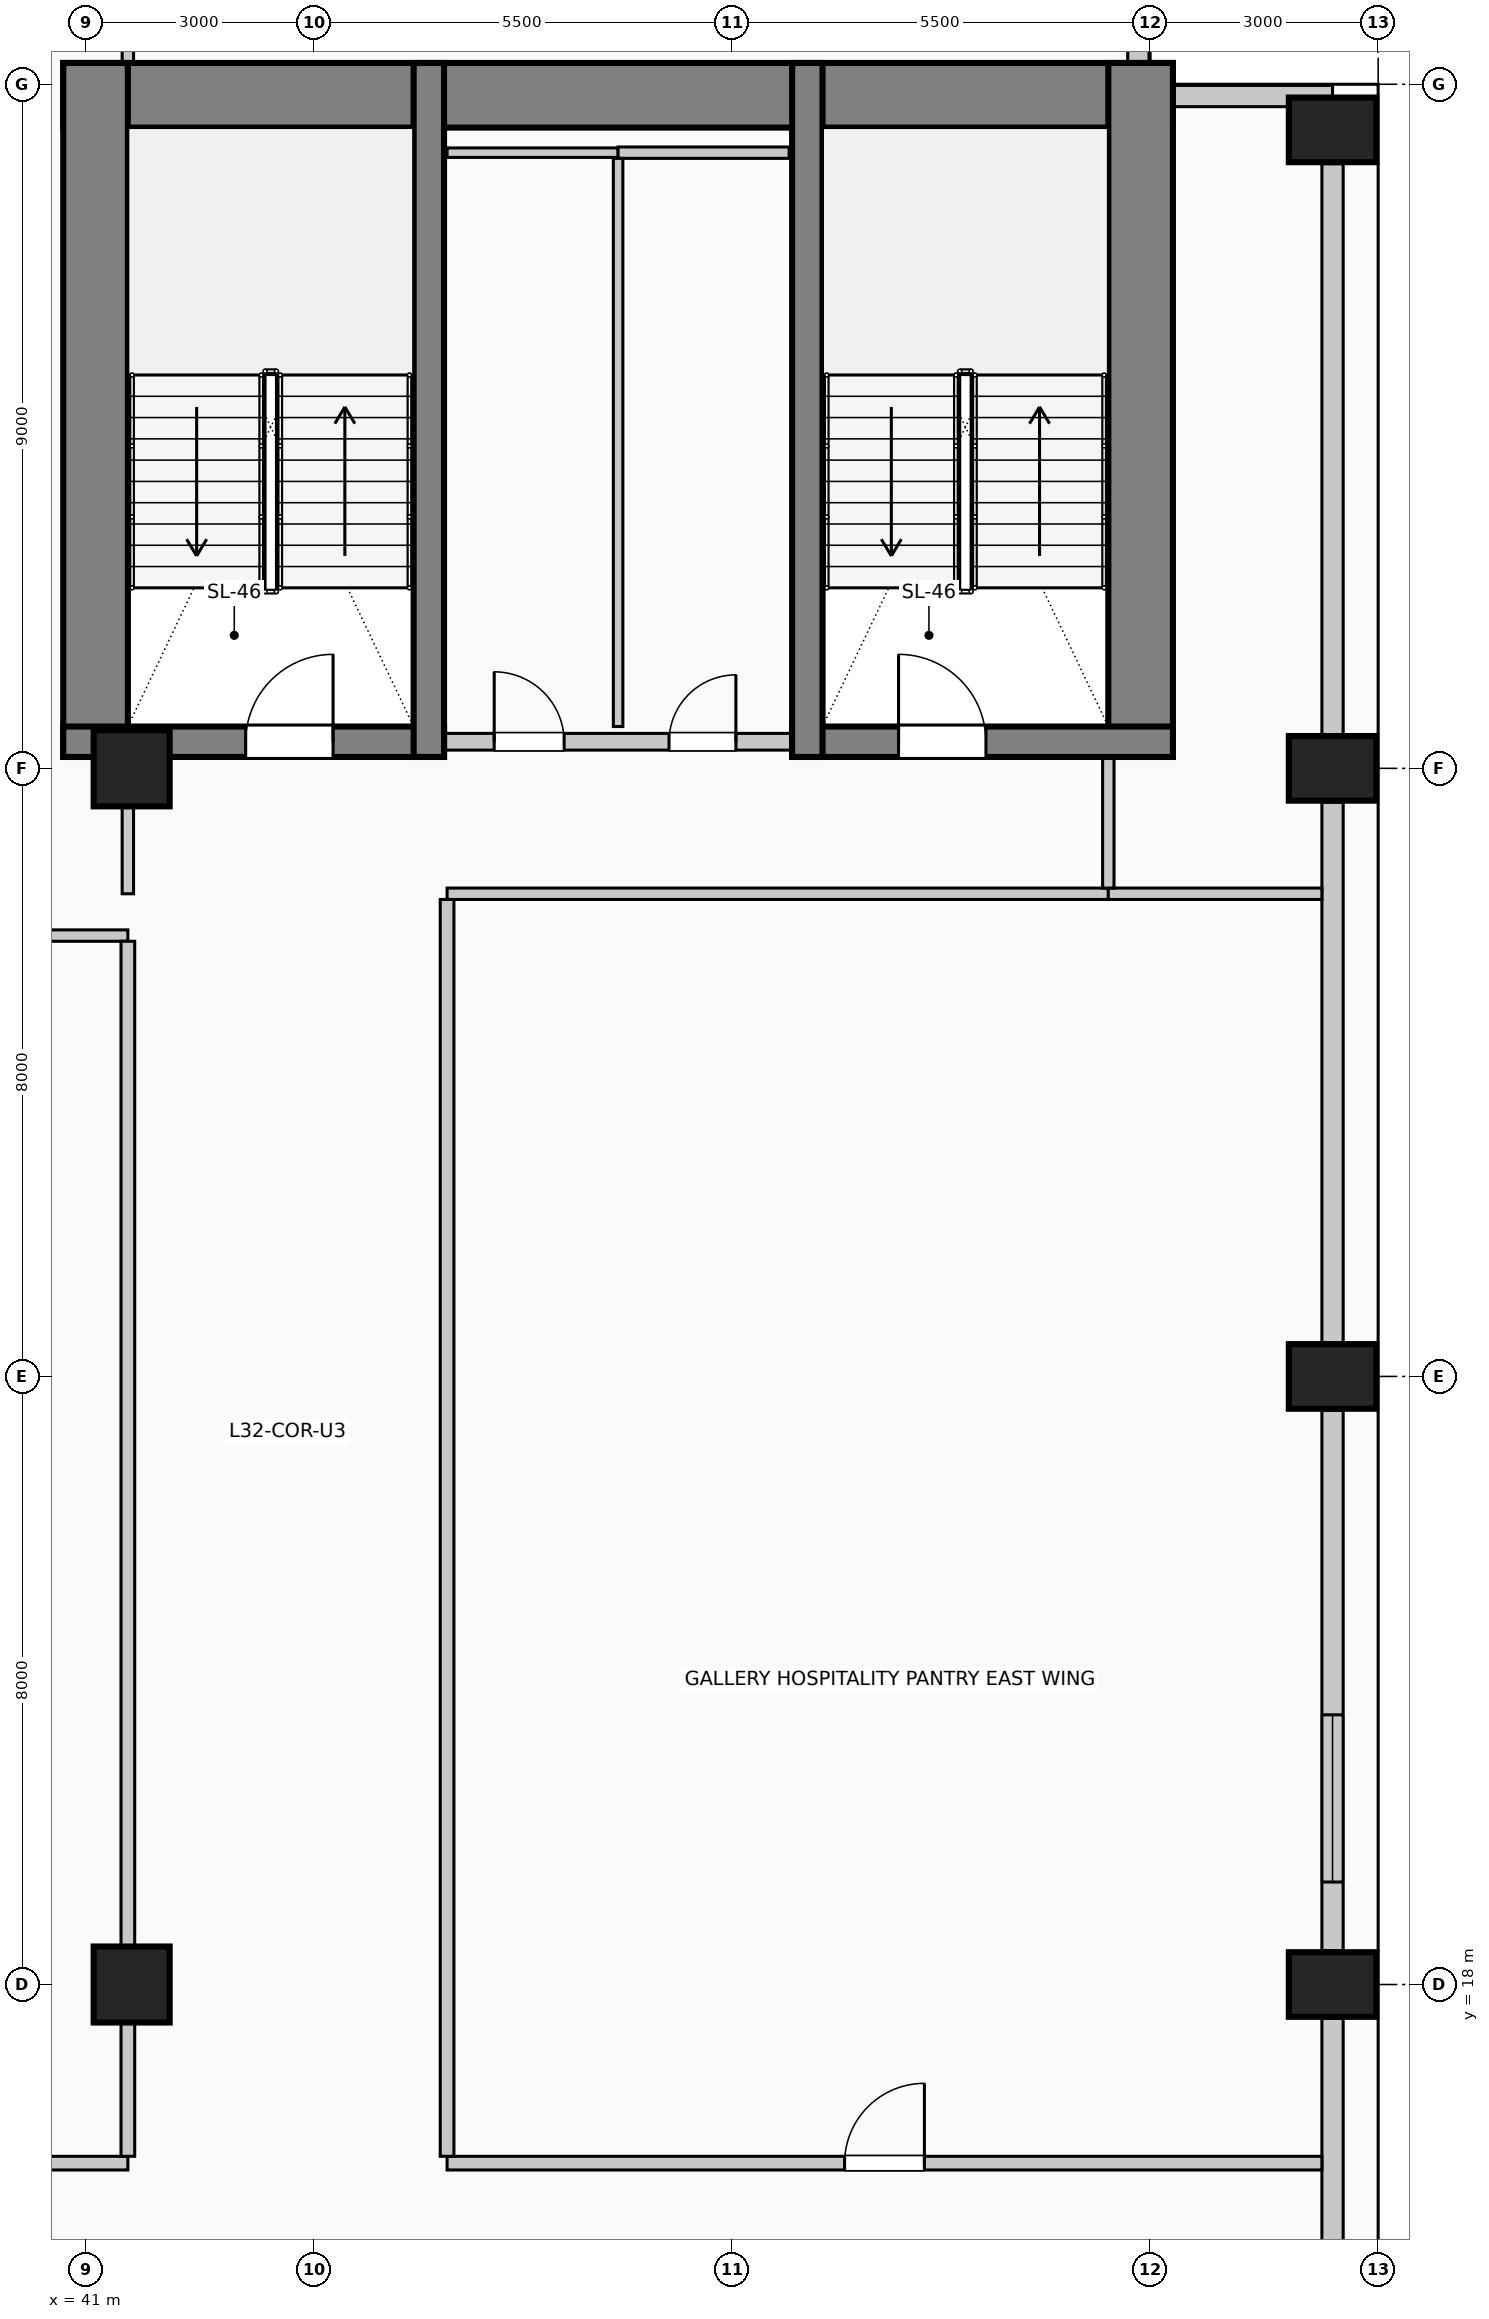
"""IFC4 building model, lengths in metres.
Left out: names, types, materials, properties, quantities, classifications, styles, units other than length and angle.
Written with IfcOpenShell. Run it as: python <this file> out.ifc"""

import sys

from ifc_helpers import new_model, si_unit, direction, frame, frame_2d, origin, origin_2d, place, context, subcontext, project, spatial, rectangle, circle, extrude, element, fill, save


model = new_model("IFC4")
c1 = context("Model", 3, precision=1e-05, world=origin(), true_north=direction((0.0, 1.0)))
c2 = subcontext(c1, "Body", "Model", "MODEL_VIEW")
j1 = project(units=[si_unit("LENGTHUNIT", "METRE"), si_unit("PLANEANGLEUNIT", "RADIAN")], contexts=[c1])
p1 = place(None, origin())
s1 = spatial("IfcSite", under=j1, at=p1, CompositionType="ELEMENT")
p2 = place(p1, origin())
s2 = spatial("IfcBuilding", under=s1, at=p2, CompositionType="ELEMENT")
p3 = place(p2, frame((0.0, 0.0, 132.6)))
s3 = spatial("IfcBuildingStorey", under=s2, at=p3, CompositionType="ELEMENT", Elevation=132.6)
p4 = place(p3, frame((40.7, 42.855, 0.0), z_axis=(0.0, 0.0, 1.0), x_axis=(1.0, 0.0, 0.0)))
e1 = element("IfcWall", 1, at=p4, inside=s3, PredefinedType="SHEAR", context=c2, shape_type="SweptSolid", body=[
    extrude(rectangle(XDim=14.6, YDim=0.85, at=frame_2d((7.3, 0.0))), origin(), (0.0, 0.0, 1.0), 4.0),
])
for number, where, z_axis, x_axis in (
    (2, (41.125, 34.15, 0.0), (0.0, 0.0, 1.0), (0.0, 1.0, 0.0)),
    (3, (54.875, 34.15, 0.0), (0.0, 0.0, 1.0), (0.0, 1.0, 0.0)),
):
    element("IfcWall", number, at=place(p3, frame(where, z_axis=z_axis, x_axis=x_axis)), inside=s3, PredefinedType="SHEAR", context=c2, shape_type="SweptSolid", body=[
        extrude(rectangle(XDim=9.13, YDim=0.85, at=frame_2d((4.565, 0.0))), origin(), (0.0, 0.0, 1.0), 4.0),
    ])
p5 = place(p3, frame((40.7, 34.35, 0.0), z_axis=(0.0, 0.0, 1.0), x_axis=(1.0, 0.0, 0.0)))
e4 = element("IfcWall", 4, at=p5, inside=s3, PredefinedType="SHEAR", context=c2, shape_type="SweptSolid", body=[
    extrude(rectangle(XDim=5.01, YDim=0.4, at=frame_2d((2.505, 0.0))), origin(), (0.0, 0.0, 1.0), 4.0),
])
p6 = place(p5, frame((2.4, 0.0, 0.0)))
e5 = element("IfcOpeningElement", 5, at=p6, cuts=e4, PredefinedType="OPENING", context=c2, shape_type="SweptSolid", body=[
    extrude(rectangle(XDim=1.15, YDim=2.2, at=frame_2d((0.575, 1.1))), frame((0.0, 0.21, 0.0), z_axis=(0.0, -1.0, 0.0), x_axis=(1.0, 0.0, 0.0)), (0.0, 0.0, 1.0), 0.42),
])
p7 = place(p3, frame((45.51, 34.15, 0.0), z_axis=(0.0, 0.0, 1.0), x_axis=(0.0, 1.0, 0.0)))
e6 = element("IfcWall", 6, at=p7, inside=s3, PredefinedType="SHEAR", context=c2, shape_type="SweptSolid", body=[
    extrude(rectangle(XDim=9.13, YDim=0.4, at=frame_2d((4.565, 0.0))), origin(), (0.0, 0.0, 1.0), 4.0),
])
p8 = place(p3, frame((50.29, 34.35, 0.0), z_axis=(0.0, 0.0, 1.0), x_axis=(1.0, 0.0, 0.0)))
e7 = element("IfcWall", 7, at=p8, inside=s3, PredefinedType="SHEAR", context=c2, shape_type="SweptSolid", body=[
    extrude(rectangle(XDim=5.01, YDim=0.4, at=frame_2d((2.505, 0.0))), origin(), (0.0, 0.0, 1.0), 4.0),
])
p9 = place(p8, frame((1.4, 0.0, 0.0)))
e8 = element("IfcOpeningElement", 8, at=p9, cuts=e7, PredefinedType="OPENING", context=c2, shape_type="SweptSolid", body=[
    extrude(rectangle(XDim=1.15, YDim=2.2, at=frame_2d((0.575, 1.1))), frame((0.0, 0.21, 0.0), z_axis=(0.0, -1.0, 0.0), x_axis=(1.0, 0.0, 0.0)), (0.0, 0.0, 1.0), 0.42),
])
p10 = place(p3, frame((50.49, 34.15, 0.0), z_axis=(0.0, 0.0, 1.0), x_axis=(0.0, 1.0, 0.0)))
e9 = element("IfcWall", 9, at=p10, inside=s3, PredefinedType="SHEAR", context=c2, shape_type="SweptSolid", body=[
    extrude(rectangle(XDim=9.13, YDim=0.4, at=frame_2d((4.565, 0.0))), origin(), (0.0, 0.0, 1.0), 4.0),
])
for number, where, z_axis, x_axis in (
    (10, (57.4, 18.0, 0.0), (0.0, 0.0, 1.0), (0.0, 1.0, 0.0)),
    (11, (57.4, 26.0, 0.0), (0.0, 0.0, 1.0), (0.0, 1.0, 0.0)),
    (12, (57.4, 34.0, 0.0), (0.0, 0.0, 1.0), (0.0, 1.0, 0.0)),
    (13, (57.4, 42.4, 0.0), (0.0, 0.0, 1.0), (0.0, 1.0, 0.0)),
):
    element("IfcColumn", number, at=place(p3, frame(where, z_axis=z_axis, x_axis=x_axis)), inside=s3, PredefinedType="COLUMN", context=c2, shape_type="SweptSolid", body=[
        extrude(rectangle(XDim=0.85, YDim=1.15, at=origin_2d()), origin(), (0.0, 0.0, 1.0), 4.0),
    ])
for number, where, z_axis, x_axis in (
    (14, (41.6, 18.0, 0.0), (0.0, 0.0, 1.0), (1.0, 0.0, 0.0)),
    (15, (41.6, 34.0, 0.0), (0.0, 0.0, 1.0), (1.0, 0.0, 0.0)),
):
    element("IfcColumn", number, at=place(p3, frame(where, z_axis=z_axis, x_axis=x_axis)), inside=s3, PredefinedType="COLUMN", context=c2, shape_type="SweptSolid", body=[
        extrude(circle(Radius=0.5, at=origin_2d()), origin(), (0.0, 0.0, 1.0), 4.0),
    ])
p11 = place(p3, frame((57.4, 17.555, 0.0), z_axis=(0.0, 0.0, 1.0), x_axis=(0.0, -1.0, 0.0)))
e16 = element("IfcWall", 16, at=p11, inside=s3, PredefinedType="SOLIDWALL", context=c2, shape_type="SweptSolid", body=[
    extrude(rectangle(XDim=7.11, YDim=0.28, at=frame_2d((3.555, 0.0))), origin(), (0.0, 0.0, 1.0), 2.875),
])
p12 = place(p3, frame((57.4, 25.555, 0.0), z_axis=(0.0, 0.0, 1.0), x_axis=(0.0, -1.0, 0.0)))
e17 = element("IfcWall", 17, at=p12, inside=s3, PredefinedType="SOLIDWALL", context=c2, shape_type="SweptSolid", body=[
    extrude(rectangle(XDim=7.11, YDim=0.28, at=frame_2d((3.555, 0.0))), origin(), (0.0, 0.0, 1.0), 2.875),
])
p13 = place(p12, frame((4.007, 0.0, 0.5)))
e18 = element("IfcOpeningElement", 18, at=p13, cuts=e17, PredefinedType="OPENING", context=c2, shape_type="SweptSolid", body=[
    extrude(rectangle(XDim=2.2, YDim=1.95, at=frame_2d((1.1, 0.975))), frame((0.0, 0.15, 0.0), z_axis=(0.0, -1.0, 0.0), x_axis=(1.0, 0.0, 0.0)), (0.0, 0.0, 1.0), 0.3),
])
p14 = place(p3, frame((57.4, 33.555, 0.0), z_axis=(0.0, 0.0, 1.0), x_axis=(0.0, -1.0, 0.0)))
e19 = element("IfcWall", 19, at=p14, inside=s3, PredefinedType="SOLIDWALL", context=c2, shape_type="SweptSolid", body=[
    extrude(rectangle(XDim=7.11, YDim=0.28, at=frame_2d((3.555, 0.0))), origin(), (0.0, 0.0, 1.0), 2.875),
])
p15 = place(p3, frame((57.4, 41.955, 0.0), z_axis=(0.0, 0.0, 1.0), x_axis=(0.0, -1.0, 0.0)))
e20 = element("IfcWall", 20, at=p15, inside=s3, PredefinedType="SOLIDWALL", context=c2, shape_type="SweptSolid", body=[
    extrude(rectangle(XDim=7.51, YDim=0.28, at=frame_2d((3.755, 0.0))), origin(), (0.0, 0.0, 1.0), 2.875),
])
p16 = place(p3, frame((54.845, 45.4, 0.0), z_axis=(0.0, 0.0, 1.0), x_axis=(0.0, -1.0, 0.0)))
e21 = element("IfcWall", 21, at=p16, inside=s3, PredefinedType="SOLIDWALL", context=c2, shape_type="SweptSolid", body=[
    extrude(rectangle(XDim=2.115, YDim=0.28, at=frame_2d((1.058, 0.0))), origin(), (0.0, 0.0, 1.0), 3.725),
])
p17 = place(p3, frame((55.305, 42.845, 0.0), z_axis=(0.0, 0.0, 1.0), x_axis=(1.0, 0.0, 0.0)))
e22 = element("IfcWall", 22, at=p17, inside=s3, PredefinedType="SOLIDWALL", context=c2, shape_type="SweptSolid", body=[
    extrude(rectangle(XDim=2.095, YDim=0.28, at=frame_2d((1.047, 0.0))), origin(), (0.0, 0.0, 1.0), 3.725),
])
p18 = place(p3, frame((45.72, 34.35, 0.0), z_axis=(0.0, 0.0, 1.0), x_axis=(1.0, 0.0, 0.0)))
e23 = element("IfcWall", 23, at=p18, inside=s3, PredefinedType="PARTITIONING", context=c2, shape_type="SweptSolid", body=[
    extrude(rectangle(XDim=4.56, YDim=0.22, at=frame_2d((2.28, 0.0))), origin(), (0.0, 0.0, 1.0), 3.725),
])
p19 = place(p18, frame((0.65, 0.0, 0.0)))
e24 = element("IfcOpeningElement", 24, at=p19, cuts=e23, PredefinedType="OPENING", context=c2, shape_type="SweptSolid", body=[
    extrude(rectangle(XDim=0.92, YDim=2.1, at=frame_2d((0.46, 1.05))), frame((0.0, 0.12, 0.0), z_axis=(0.0, -1.0, 0.0), x_axis=(1.0, 0.0, 0.0)), (0.0, 0.0, 1.0), 0.24),
])
p20 = place(p18, frame((2.95, 0.0, 0.0)))
e25 = element("IfcOpeningElement", 25, at=p20, cuts=e23, PredefinedType="OPENING", context=c2, shape_type="SweptSolid", body=[
    extrude(rectangle(XDim=0.88, YDim=2.1, at=frame_2d((0.44, 1.05))), frame((0.0, 0.12, 0.0), z_axis=(0.0, -1.0, 0.0), x_axis=(1.0, 0.0, 0.0)), (0.0, 0.0, 1.0), 0.24),
])
p21 = place(p3, frame((24.5, 15.65, 0.0), z_axis=(0.0, 0.0, 1.0), x_axis=(1.0, 0.0, 0.0)))
e26 = element("IfcWall", 26, at=p21, inside=s3, PredefinedType="PARTITIONING", context=c2, shape_type="SweptSolid", body=[
    extrude(rectangle(XDim=17.05, YDim=0.18, at=frame_2d((8.525, 0.0))), origin(), (0.0, 0.0, 1.0), 3.725),
])
p22 = place(p21, frame((8.05, 0.0, 0.0)))
e27 = element("IfcOpeningElement", 27, at=p22, cuts=e26, PredefinedType="OPENING", context=c2, shape_type="SweptSolid", body=[
    extrude(rectangle(XDim=0.95, YDim=2.15, at=frame_2d((0.475, 1.075))), frame((0.0, 0.1, 0.0), z_axis=(0.0, -1.0, 0.0), x_axis=(1.0, 0.0, 0.0)), (0.0, 0.0, 1.0), 0.2),
])
p23 = place(p3, frame((45.75, 15.65, 0.0), z_axis=(0.0, 0.0, 1.0), x_axis=(1.0, 0.0, 0.0)))
e28 = element("IfcWall", 28, at=p23, inside=s3, PredefinedType="PARTITIONING", context=c2, shape_type="SweptSolid", body=[
    extrude(rectangle(XDim=11.51, YDim=0.18, at=frame_2d((5.755, 0.0))), origin(), (0.0, 0.0, 1.0), 3.725),
])
p24 = place(p23, frame((5.23, 0.0, 0.0)))
e29 = element("IfcOpeningElement", 29, at=p24, cuts=e28, PredefinedType="OPENING", context=c2, shape_type="SweptSolid", body=[
    extrude(rectangle(XDim=1.05, YDim=2.15, at=frame_2d((0.525, 1.075))), frame((0.0, 0.1, 0.0), z_axis=(0.0, -1.0, 0.0), x_axis=(1.0, 0.0, 0.0)), (0.0, 0.0, 1.0), 0.2),
])
p25 = place(p3, frame((24.5, 31.8, 0.0), z_axis=(0.0, 0.0, 1.0), x_axis=(1.0, 0.0, 0.0)))
e30 = element("IfcWall", 30, at=p25, inside=s3, PredefinedType="PARTITIONING", context=c2, shape_type="SweptSolid", body=[
    extrude(rectangle(XDim=17.05, YDim=0.15, at=frame_2d((8.525, 0.0))), origin(), (0.0, 0.0, 1.0), 3.725),
])
p26 = place(p3, frame((45.75, 32.35, 0.0), z_axis=(0.0, 0.0, 1.0), x_axis=(1.0, 0.0, 0.0)))
e31 = element("IfcWall", 31, at=p26, inside=s3, PredefinedType="PARTITIONING", context=c2, shape_type="SweptSolid", body=[
    extrude(rectangle(XDim=8.7, YDim=0.15, at=frame_2d((4.35, 0.0))), origin(), (0.0, 0.0, 1.0), 3.725),
])
p27 = place(p3, frame((54.45, 32.35, 0.0), z_axis=(0.0, 0.0, 1.0), x_axis=(1.0, 0.0, 0.0)))
e32 = element("IfcWall", 32, at=p27, inside=s3, PredefinedType="PARTITIONING", context=c2, shape_type="SweptSolid", body=[
    extrude(rectangle(XDim=2.81, YDim=0.15, at=frame_2d((1.405, 0.0))), origin(), (0.0, 0.0, 1.0), 3.725),
])
p28 = place(p3, frame((45.75, 42.1, 0.0), z_axis=(0.0, 0.0, 1.0), x_axis=(1.0, 0.0, 0.0)))
e33 = element("IfcWall", 33, at=p28, inside=s3, PredefinedType="PARTITIONING", context=c2, shape_type="SweptSolid", body=[
    extrude(rectangle(XDim=2.25, YDim=0.125, at=frame_2d((1.125, 0.0))), origin(), (0.0, 0.0, 1.0), 3.725),
])
p29 = place(p3, frame((48.0, 42.1, 0.0), z_axis=(0.0, 0.0, 1.0), x_axis=(1.0, 0.0, 0.0)))
e34 = element("IfcWall", 34, at=p29, inside=s3, PredefinedType="PARTITIONING", context=c2, shape_type="SweptSolid", body=[
    extrude(rectangle(XDim=2.25, YDim=0.15, at=frame_2d((1.125, 0.0))), origin(), (0.0, 0.0, 1.0), 3.725),
])
p30 = place(p3, frame((41.55, 15.74, 0.0), z_axis=(0.0, 0.0, 1.0), x_axis=(0.0, 1.0, 0.0)))
e35 = element("IfcWall", 35, at=p30, inside=s3, PredefinedType="PARTITIONING", context=c2, shape_type="SweptSolid", body=[
    extrude(rectangle(XDim=1.76, YDim=0.18, at=frame_2d((0.88, 0.0))), origin(), (0.0, 0.0, 1.0), 3.07),
])
p31 = place(p3, frame((41.55, 18.5, 0.0), z_axis=(0.0, 0.0, 1.0), x_axis=(0.0, 1.0, 0.0)))
e36 = element("IfcWall", 36, at=p31, inside=s3, PredefinedType="PARTITIONING", context=c2, shape_type="SweptSolid", body=[
    extrude(rectangle(XDim=13.225, YDim=0.18, at=frame_2d((6.613, 0.0))), origin(), (0.0, 0.0, 1.0), 3.07),
])
p32 = place(p3, frame((41.55, 32.35, 0.0), z_axis=(0.0, 0.0, 1.0), x_axis=(0.0, 1.0, 0.0)))
e37 = element("IfcWall", 37, at=p32, inside=s3, PredefinedType="PARTITIONING", context=c2, shape_type="SweptSolid", body=[
    extrude(rectangle(XDim=1.15, YDim=0.15, at=frame_2d((0.575, 0.0))), origin(), (0.0, 0.0, 1.0), 3.07),
])
p33 = place(p3, frame((41.55, 43.28, 0.0), z_axis=(0.0, 0.0, 1.0), x_axis=(0.0, 1.0, 0.0)))
e38 = element("IfcWall", 38, at=p33, inside=s3, PredefinedType="PARTITIONING", context=c2, shape_type="SweptSolid", body=[
    extrude(rectangle(XDim=1.42, YDim=0.15, at=frame_2d((0.71, 0.0))), origin(), (0.0, 0.0, 1.0), 3.725),
])
p34 = place(p3, frame((45.75, 15.74, 0.0), z_axis=(0.0, 0.0, 1.0), x_axis=(0.0, 1.0, 0.0)))
e39 = element("IfcWall", 39, at=p34, inside=s3, PredefinedType="PARTITIONING", context=c2, shape_type="SweptSolid", body=[
    extrude(rectangle(XDim=16.535, YDim=0.18, at=frame_2d((8.268, 0.0))), origin(), (0.0, 0.0, 1.0), 3.725),
])
p35 = place(p3, frame((48.0, 34.55, 0.0), z_axis=(0.0, 0.0, 1.0), x_axis=(0.0, 1.0, 0.0)))
e40 = element("IfcWall", 40, at=p35, inside=s3, PredefinedType="PARTITIONING", context=c2, shape_type="SweptSolid", body=[
    extrude(rectangle(XDim=7.475, YDim=0.125, at=frame_2d((3.737, 0.0))), origin(), (0.0, 0.0, 1.0), 3.725),
])
p36 = place(p3, frame((54.45, 32.425, 0.0), z_axis=(0.0, 0.0, 1.0), x_axis=(0.0, 1.0, 0.0)))
e41 = element("IfcWall", 41, at=p36, inside=s3, PredefinedType="PARTITIONING", context=c2, shape_type="SweptSolid", body=[
    extrude(rectangle(XDim=1.725, YDim=0.15, at=frame_2d((0.862, 0.0))), origin(), (0.0, 0.0, 1.0), 3.725),
])
p37 = place(p13, origin())
e42 = element("IfcWindow", 42, at=p37, inside=s3, PartitioningType="SINGLE_PANEL", PredefinedType="WINDOW", context=c2, shape_type="SweptSolid", body=[
    extrude(rectangle(XDim=2.2, YDim=1.95, at=frame_2d((1.1, 0.975))), frame((0.0, 0.03, 0.0), z_axis=(0.0, -1.0, 0.0), x_axis=(1.0, 0.0, 0.0)), (0.0, 0.0, 1.0), 0.06),
])
fill(e18, e42)
p38 = place(p6, origin())
e43 = element("IfcDoor", 43, at=p38, inside=s3, OperationType="SINGLE_SWING_RIGHT", PredefinedType="DOOR", context=c2, shape_type="SweptSolid", body=[
    extrude(rectangle(XDim=1.15, YDim=2.2, at=frame_2d((0.575, 1.1))), frame((0.0, 0.025, 0.0), z_axis=(0.0, -1.0, 0.0), x_axis=(1.0, 0.0, 0.0)), (0.0, 0.0, 1.0), 0.05),
])
fill(e5, e43)
p39 = place(p19, origin())
e44 = element("IfcDoor", 44, at=p39, inside=s3, OperationType="SINGLE_SWING_LEFT", PredefinedType="DOOR", context=c2, shape_type="SweptSolid", body=[
    extrude(rectangle(XDim=0.92, YDim=2.1, at=frame_2d((0.46, 1.05))), frame((0.0, 0.025, 0.0), z_axis=(0.0, -1.0, 0.0), x_axis=(1.0, 0.0, 0.0)), (0.0, 0.0, 1.0), 0.05),
])
fill(e24, e44)
p40 = place(p20, origin())
e45 = element("IfcDoor", 45, at=p40, inside=s3, OperationType="SINGLE_SWING_RIGHT", PredefinedType="DOOR", context=c2, shape_type="SweptSolid", body=[
    extrude(rectangle(XDim=0.88, YDim=2.1, at=frame_2d((0.44, 1.05))), frame((0.0, 0.025, 0.0), z_axis=(0.0, -1.0, 0.0), x_axis=(1.0, 0.0, 0.0)), (0.0, 0.0, 1.0), 0.05),
])
fill(e25, e45)
p41 = place(p9, origin())
e46 = element("IfcDoor", 46, at=p41, inside=s3, OperationType="SINGLE_SWING_LEFT", PredefinedType="DOOR", context=c2, shape_type="SweptSolid", body=[
    extrude(rectangle(XDim=1.15, YDim=2.2, at=frame_2d((0.575, 1.1))), frame((0.0, 0.025, 0.0), z_axis=(0.0, -1.0, 0.0), x_axis=(1.0, 0.0, 0.0)), (0.0, 0.0, 1.0), 0.05),
])
fill(e8, e46)
p42 = place(p24, origin())
e47 = element("IfcDoor", 47, at=p42, inside=s3, OperationType="SINGLE_SWING_RIGHT", PredefinedType="DOOR", context=c2, shape_type="SweptSolid", body=[
    extrude(rectangle(XDim=1.05, YDim=2.15, at=frame_2d((0.525, 1.075))), frame((0.0, 0.025, 0.0), z_axis=(0.0, -1.0, 0.0), x_axis=(1.0, 0.0, 0.0)), (0.0, 0.0, 1.0), 0.05),
])
fill(e29, e47)
save(model, sys.argv[1])
